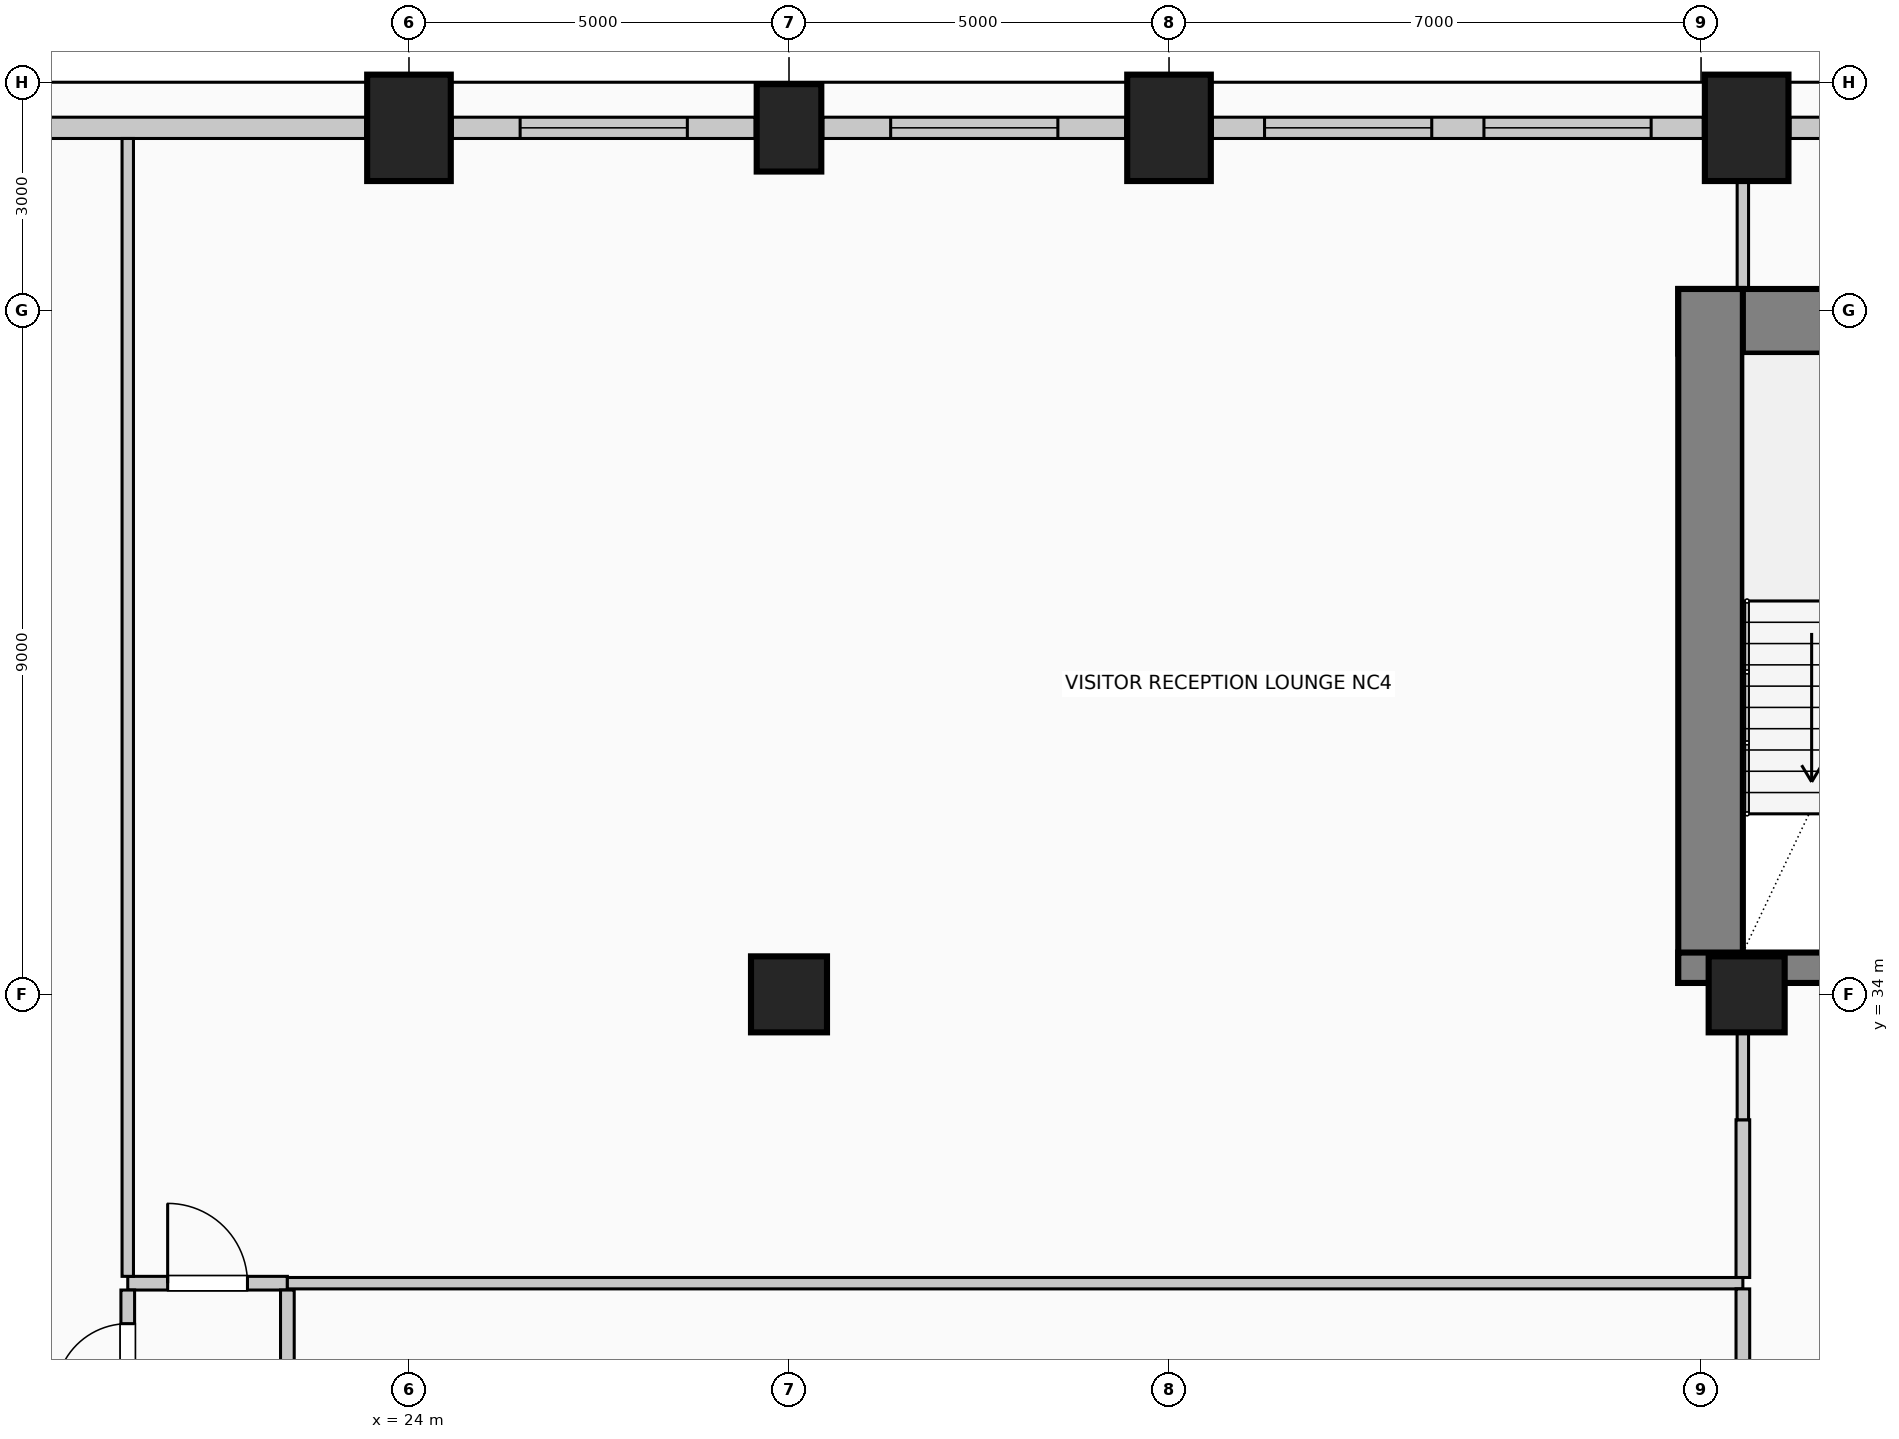
"""IFC4 building model, lengths in metres.
Left out: names, types, materials, properties, quantities, classifications, styles, units other than length and angle.
Written with IfcOpenShell. Run it as: python <this file> out.ifc"""

import sys

from ifc_helpers import new_model, si_unit, direction, frame, frame_2d, origin, origin_2d, place, context, subcontext, project, spatial, rectangle, circle, extrude, element, fill, save


model = new_model("IFC4")
c1 = context("Model", 3, precision=1e-05, world=origin(), true_north=direction((0.0, 1.0)))
c2 = subcontext(c1, "Body", "Model", "MODEL_VIEW")
j1 = project(units=[si_unit("LENGTHUNIT", "METRE"), si_unit("PLANEANGLEUNIT", "RADIAN")], contexts=[c1])
p1 = place(None, origin())
s1 = spatial("IfcSite", under=j1, at=p1, CompositionType="ELEMENT")
p2 = place(p1, origin())
s2 = spatial("IfcBuilding", under=s1, at=p2, CompositionType="ELEMENT")
p3 = place(p2, frame((0.0, 0.0, 156.6)))
s3 = spatial("IfcBuildingStorey", under=s2, at=p3, CompositionType="ELEMENT", Elevation=156.6)
p4 = place(p3, frame((40.7, 42.855, 0.0), z_axis=(0.0, 0.0, 1.0), x_axis=(1.0, 0.0, 0.0)))
e1 = element("IfcWall", 1, at=p4, inside=s3, PredefinedType="SHEAR", context=c2, shape_type="SweptSolid", body=[
    extrude(rectangle(XDim=14.6, YDim=0.85, at=frame_2d((7.3, 0.0))), origin(), (0.0, 0.0, 1.0), 4.0),
])
p5 = place(p3, frame((41.125, 34.15, 0.0), z_axis=(0.0, 0.0, 1.0), x_axis=(0.0, 1.0, 0.0)))
e2 = element("IfcWall", 2, at=p5, inside=s3, PredefinedType="SHEAR", context=c2, shape_type="SweptSolid", body=[
    extrude(rectangle(XDim=9.13, YDim=0.85, at=frame_2d((4.565, 0.0))), origin(), (0.0, 0.0, 1.0), 4.0),
])
p6 = place(p3, frame((40.7, 34.35, 0.0), z_axis=(0.0, 0.0, 1.0), x_axis=(1.0, 0.0, 0.0)))
e3 = element("IfcWall", 3, at=p6, inside=s3, PredefinedType="SHEAR", context=c2, shape_type="SweptSolid", body=[
    extrude(rectangle(XDim=5.01, YDim=0.4, at=frame_2d((2.505, 0.0))), origin(), (0.0, 0.0, 1.0), 4.0),
])
p7 = place(p6, frame((2.4, 0.0, 0.0)))
e4 = element("IfcOpeningElement", 4, at=p7, cuts=e3, PredefinedType="OPENING", context=c2, shape_type="SweptSolid", body=[
    extrude(rectangle(XDim=1.15, YDim=2.2, at=frame_2d((0.575, 1.1))), frame((0.0, 0.21, 0.0), z_axis=(0.0, -1.0, 0.0), x_axis=(1.0, 0.0, 0.0)), (0.0, 0.0, 1.0), 0.42),
])
p8 = place(p3, frame((24.0, 45.4, 0.0), z_axis=(0.0, 0.0, 1.0), x_axis=(1.0, 0.0, 0.0)))
e5 = element("IfcColumn", 5, at=p8, inside=s3, PredefinedType="COLUMN", context=c2, shape_type="SweptSolid", body=[
    extrude(rectangle(XDim=1.1, YDim=1.4, at=origin_2d()), origin(), (0.0, 0.0, 1.0), 4.0),
])
p9 = place(p3, frame((29.0, 45.4, 0.0), z_axis=(0.0, 0.0, 1.0), x_axis=(1.0, 0.0, 0.0)))
e6 = element("IfcColumn", 6, at=p9, inside=s3, PredefinedType="COLUMN", context=c2, shape_type="SweptSolid", body=[
    extrude(rectangle(XDim=0.85, YDim=1.15, at=origin_2d()), origin(), (0.0, 0.0, 1.0), 4.0),
])
for number, where, z_axis, x_axis in (
    (7, (34.0, 45.4, 0.0), (0.0, 0.0, 1.0), (1.0, 0.0, 0.0)),
    (8, (41.6, 45.4, 0.0), (0.0, 0.0, 1.0), (1.0, 0.0, 0.0)),
):
    element("IfcColumn", number, at=place(p3, frame(where, z_axis=z_axis, x_axis=x_axis)), inside=s3, PredefinedType="COLUMN", context=c2, shape_type="SweptSolid", body=[
        extrude(rectangle(XDim=1.1, YDim=1.4, at=origin_2d()), origin(), (0.0, 0.0, 1.0), 4.0),
    ])
for number, where, z_axis, x_axis in (
    (9, (29.0, 34.0, 0.0), (0.0, 0.0, 1.0), (1.0, 0.0, 0.0)),
    (10, (41.6, 34.0, 0.0), (0.0, 0.0, 1.0), (1.0, 0.0, 0.0)),
):
    element("IfcColumn", number, at=place(p3, frame(where, z_axis=z_axis, x_axis=x_axis)), inside=s3, PredefinedType="COLUMN", context=c2, shape_type="SweptSolid", body=[
        extrude(circle(Radius=0.5, at=origin_2d()), origin(), (0.0, 0.0, 1.0), 4.0),
    ])
p10 = place(p3, frame((16.97, 45.4, 0.0), z_axis=(0.0, 0.0, 1.0), x_axis=(1.0, 0.0, 0.0)))
e11 = element("IfcWall", 11, at=p10, inside=s3, PredefinedType="SOLIDWALL", context=c2, shape_type="SweptSolid", body=[
    extrude(rectangle(XDim=6.46, YDim=0.28, at=frame_2d((3.23, 0.0))), origin(), (0.0, 0.0, 1.0), 2.81),
])
p11 = place(p3, frame((24.57, 45.4, 0.0), z_axis=(0.0, 0.0, 1.0), x_axis=(1.0, 0.0, 0.0)))
e12 = element("IfcWall", 12, at=p11, inside=s3, PredefinedType="SOLIDWALL", context=c2, shape_type="SweptSolid", body=[
    extrude(rectangle(XDim=3.985, YDim=0.28, at=frame_2d((1.992, 0.0))), origin(), (0.0, 0.0, 1.0), 2.81),
])
p12 = place(p11, frame((0.893, 0.0, 0.5)))
e13 = element("IfcOpeningElement", 13, at=p12, cuts=e12, PredefinedType="OPENING", context=c2, shape_type="SweptSolid", body=[
    extrude(rectangle(XDim=2.2, YDim=1.95, at=frame_2d((1.1, 0.975))), frame((0.0, 0.15, 0.0), z_axis=(0.0, -1.0, 0.0), x_axis=(1.0, 0.0, 0.0)), (0.0, 0.0, 1.0), 0.3),
])
p13 = place(p3, frame((29.445, 45.4, 0.0), z_axis=(0.0, 0.0, 1.0), x_axis=(1.0, 0.0, 0.0)))
e14 = element("IfcWall", 14, at=p13, inside=s3, PredefinedType="SOLIDWALL", context=c2, shape_type="SweptSolid", body=[
    extrude(rectangle(XDim=3.985, YDim=0.28, at=frame_2d((1.992, 0.0))), origin(), (0.0, 0.0, 1.0), 2.81),
])
p14 = place(p13, frame((0.893, 0.0, 0.5)))
e15 = element("IfcOpeningElement", 15, at=p14, cuts=e14, PredefinedType="OPENING", context=c2, shape_type="SweptSolid", body=[
    extrude(rectangle(XDim=2.2, YDim=1.95, at=frame_2d((1.1, 0.975))), frame((0.0, 0.15, 0.0), z_axis=(0.0, -1.0, 0.0), x_axis=(1.0, 0.0, 0.0)), (0.0, 0.0, 1.0), 0.3),
])
p15 = place(p3, frame((34.57, 45.4, 0.0), z_axis=(0.0, 0.0, 1.0), x_axis=(1.0, 0.0, 0.0)))
e16 = element("IfcWall", 16, at=p15, inside=s3, PredefinedType="SOLIDWALL", context=c2, shape_type="SweptSolid", body=[
    extrude(rectangle(XDim=6.46, YDim=0.28, at=frame_2d((3.23, 0.0))), origin(), (0.0, 0.0, 1.0), 2.81),
])
p16 = place(p15, frame((0.687, 0.0, 0.5)))
e17 = element("IfcOpeningElement", 17, at=p16, cuts=e16, PredefinedType="OPENING", context=c2, shape_type="SweptSolid", body=[
    extrude(rectangle(XDim=2.2, YDim=1.95, at=frame_2d((1.1, 0.975))), frame((0.0, 0.15, 0.0), z_axis=(0.0, -1.0, 0.0), x_axis=(1.0, 0.0, 0.0)), (0.0, 0.0, 1.0), 0.3),
])
p17 = place(p15, frame((3.573, 0.0, 0.5)))
e18 = element("IfcOpeningElement", 18, at=p17, cuts=e16, PredefinedType="OPENING", context=c2, shape_type="SweptSolid", body=[
    extrude(rectangle(XDim=2.2, YDim=1.95, at=frame_2d((1.1, 0.975))), frame((0.0, 0.15, 0.0), z_axis=(0.0, -1.0, 0.0), x_axis=(1.0, 0.0, 0.0)), (0.0, 0.0, 1.0), 0.3),
])
p18 = place(p3, frame((42.17, 45.4, 0.0), z_axis=(0.0, 0.0, 1.0), x_axis=(1.0, 0.0, 0.0)))
e19 = element("IfcWall", 19, at=p18, inside=s3, PredefinedType="SOLIDWALL", context=c2, shape_type="SweptSolid", body=[
    extrude(rectangle(XDim=1.385, YDim=0.28, at=frame_2d((0.692, 0.0))), origin(), (0.0, 0.0, 1.0), 2.81),
])
p19 = place(p3, frame((20.3, 30.2, 0.0), z_axis=(0.0, 0.0, 1.0), x_axis=(1.0, 0.0, 0.0)))
e20 = element("IfcWall", 20, at=p19, inside=s3, PredefinedType="PARTITIONING", context=c2, shape_type="SweptSolid", body=[
    extrude(rectangle(XDim=2.1, YDim=0.18, at=frame_2d((1.05, 0.0))), origin(), (0.0, 0.0, 1.0), 3.66),
])
p20 = place(p19, frame((0.525, 0.0, 0.0)))
e21 = element("IfcOpeningElement", 21, at=p20, cuts=e20, PredefinedType="OPENING", context=c2, shape_type="SweptSolid", body=[
    extrude(rectangle(XDim=1.05, YDim=2.15, at=frame_2d((0.525, 1.075))), frame((0.0, 0.1, 0.0), z_axis=(0.0, -1.0, 0.0), x_axis=(1.0, 0.0, 0.0)), (0.0, 0.0, 1.0), 0.2),
])
p21 = place(p3, frame((22.4, 30.2, 0.0), z_axis=(0.0, 0.0, 1.0), x_axis=(1.0, 0.0, 0.0)))
e22 = element("IfcWall", 22, at=p21, inside=s3, PredefinedType="PARTITIONING", context=c2, shape_type="SweptSolid", body=[
    extrude(rectangle(XDim=19.15, YDim=0.15, at=frame_2d((9.575, 0.0))), origin(), (0.0, 0.0, 1.0), 3.66),
])
p22 = place(p3, frame((20.3, 28.275, 0.0), z_axis=(0.0, 0.0, 1.0), x_axis=(0.0, 1.0, 0.0)))
e23 = element("IfcWall", 23, at=p22, inside=s3, PredefinedType="PARTITIONING", context=c2, shape_type="SweptSolid", body=[
    extrude(rectangle(XDim=1.835, YDim=0.18, at=frame_2d((0.917, 0.0))), origin(), (0.0, 0.0, 1.0), 3.66),
])
p23 = place(p22, frame((0.442, 0.0, 0.0)))
e24 = element("IfcOpeningElement", 24, at=p23, cuts=e23, PredefinedType="OPENING", context=c2, shape_type="SweptSolid", body=[
    extrude(rectangle(XDim=0.95, YDim=2.15, at=frame_2d((0.475, 1.075))), frame((0.0, 0.1, 0.0), z_axis=(0.0, -1.0, 0.0), x_axis=(1.0, 0.0, 0.0)), (0.0, 0.0, 1.0), 0.2),
])
p24 = place(p3, frame((20.3, 30.29, 0.0), z_axis=(0.0, 0.0, 1.0), x_axis=(0.0, 1.0, 0.0)))
e25 = element("IfcWall", 25, at=p24, inside=s3, PredefinedType="PARTITIONING", context=c2, shape_type="SweptSolid", body=[
    extrude(rectangle(XDim=14.97, YDim=0.15, at=frame_2d((7.485, 0.0))), origin(), (0.0, 0.0, 1.0), 3.66),
])
p25 = place(p3, frame((22.4, 15.74, 0.0), z_axis=(0.0, 0.0, 1.0), x_axis=(0.0, 1.0, 0.0)))
e26 = element("IfcWall", 26, at=p25, inside=s3, PredefinedType="PARTITIONING", context=c2, shape_type="SweptSolid", body=[
    extrude(rectangle(XDim=14.37, YDim=0.18, at=frame_2d((7.185, 0.0))), origin(), (0.0, 0.0, 1.0), 3.66),
])
p26 = place(p3, frame((41.55, 18.5, 0.0), z_axis=(0.0, 0.0, 1.0), x_axis=(0.0, 1.0, 0.0)))
e27 = element("IfcWall", 27, at=p26, inside=s3, PredefinedType="PARTITIONING", context=c2, shape_type="SweptSolid", body=[
    extrude(rectangle(XDim=11.625, YDim=0.18, at=frame_2d((5.812, 0.0))), origin(), (0.0, 0.0, 1.0), 3.005),
])
p27 = place(p3, frame((41.55, 30.275, 0.0), z_axis=(0.0, 0.0, 1.0), x_axis=(0.0, 1.0, 0.0)))
e28 = element("IfcWall", 28, at=p27, inside=s3, PredefinedType="PARTITIONING", context=c2, shape_type="SweptSolid", body=[
    extrude(rectangle(XDim=2.075, YDim=0.18, at=frame_2d((1.038, 0.0))), origin(), (0.0, 0.0, 1.0), 3.005),
])
p28 = place(p3, frame((41.55, 32.35, 0.0), z_axis=(0.0, 0.0, 1.0), x_axis=(0.0, 1.0, 0.0)))
e29 = element("IfcWall", 29, at=p28, inside=s3, PredefinedType="PARTITIONING", context=c2, shape_type="SweptSolid", body=[
    extrude(rectangle(XDim=1.15, YDim=0.15, at=frame_2d((0.575, 0.0))), origin(), (0.0, 0.0, 1.0), 3.005),
])
p29 = place(p3, frame((41.55, 43.28, 0.0), z_axis=(0.0, 0.0, 1.0), x_axis=(0.0, 1.0, 0.0)))
e30 = element("IfcWall", 30, at=p29, inside=s3, PredefinedType="PARTITIONING", context=c2, shape_type="SweptSolid", body=[
    extrude(rectangle(XDim=1.42, YDim=0.15, at=frame_2d((0.71, 0.0))), origin(), (0.0, 0.0, 1.0), 3.66),
])
p30 = place(p12, origin())
e31 = element("IfcWindow", 31, at=p30, inside=s3, PartitioningType="SINGLE_PANEL", PredefinedType="WINDOW", context=c2, shape_type="SweptSolid", body=[
    extrude(rectangle(XDim=2.2, YDim=1.95, at=frame_2d((1.1, 0.975))), frame((0.0, 0.03, 0.0), z_axis=(0.0, -1.0, 0.0), x_axis=(1.0, 0.0, 0.0)), (0.0, 0.0, 1.0), 0.06),
])
fill(e13, e31)
p31 = place(p14, origin())
e32 = element("IfcWindow", 32, at=p31, inside=s3, PartitioningType="SINGLE_PANEL", PredefinedType="WINDOW", context=c2, shape_type="SweptSolid", body=[
    extrude(rectangle(XDim=2.2, YDim=1.95, at=frame_2d((1.1, 0.975))), frame((0.0, 0.03, 0.0), z_axis=(0.0, -1.0, 0.0), x_axis=(1.0, 0.0, 0.0)), (0.0, 0.0, 1.0), 0.06),
])
fill(e15, e32)
p32 = place(p16, origin())
e33 = element("IfcWindow", 33, at=p32, inside=s3, PartitioningType="SINGLE_PANEL", PredefinedType="WINDOW", context=c2, shape_type="SweptSolid", body=[
    extrude(rectangle(XDim=2.2, YDim=1.95, at=frame_2d((1.1, 0.975))), frame((0.0, 0.03, 0.0), z_axis=(0.0, -1.0, 0.0), x_axis=(1.0, 0.0, 0.0)), (0.0, 0.0, 1.0), 0.06),
])
fill(e17, e33)
p33 = place(p17, origin())
e34 = element("IfcWindow", 34, at=p33, inside=s3, PartitioningType="SINGLE_PANEL", PredefinedType="WINDOW", context=c2, shape_type="SweptSolid", body=[
    extrude(rectangle(XDim=2.2, YDim=1.95, at=frame_2d((1.1, 0.975))), frame((0.0, 0.03, 0.0), z_axis=(0.0, -1.0, 0.0), x_axis=(1.0, 0.0, 0.0)), (0.0, 0.0, 1.0), 0.06),
])
fill(e18, e34)
p34 = place(p20, origin())
e35 = element("IfcDoor", 35, at=p34, inside=s3, OperationType="SINGLE_SWING_LEFT", PredefinedType="DOOR", context=c2, shape_type="SweptSolid", body=[
    extrude(rectangle(XDim=1.05, YDim=2.15, at=frame_2d((0.525, 1.075))), frame((0.0, 0.025, 0.0), z_axis=(0.0, -1.0, 0.0), x_axis=(1.0, 0.0, 0.0)), (0.0, 0.0, 1.0), 0.05),
])
fill(e21, e35)
p35 = place(p23, origin())
e36 = element("IfcDoor", 36, at=p35, inside=s3, OperationType="SINGLE_SWING_LEFT", PredefinedType="DOOR", context=c2, shape_type="SweptSolid", body=[
    extrude(rectangle(XDim=0.95, YDim=2.15, at=frame_2d((0.475, 1.075))), frame((0.0, 0.025, 0.0), z_axis=(0.0, -1.0, 0.0), x_axis=(1.0, 0.0, 0.0)), (0.0, 0.0, 1.0), 0.05),
])
fill(e24, e36)
save(model, sys.argv[1])
